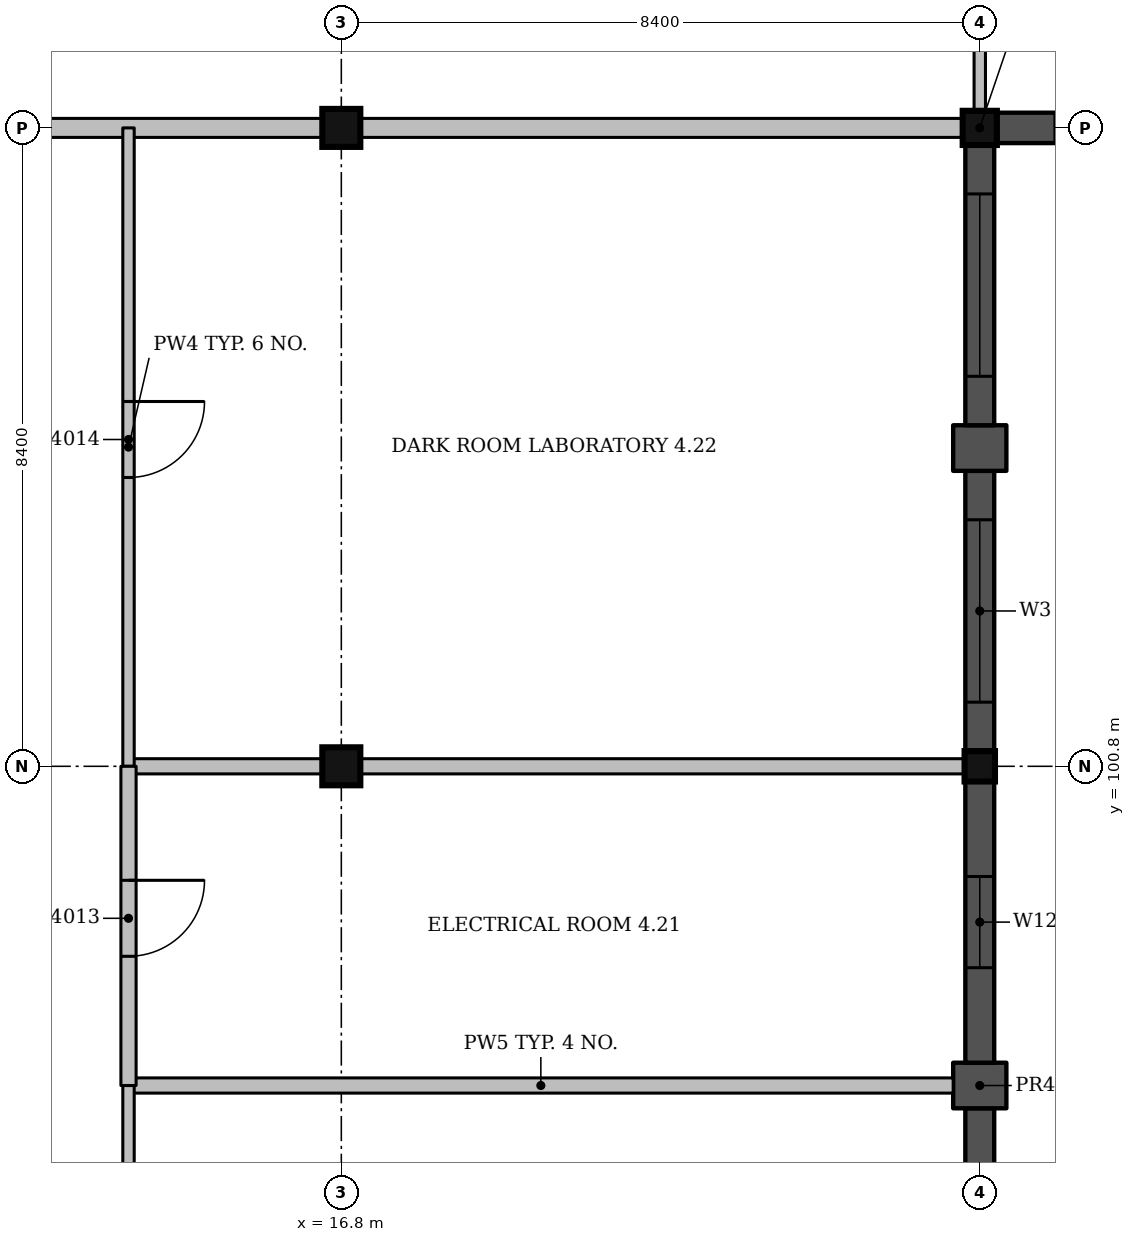
"""IFC4 building model, lengths in metres.
Left out: names, types, materials, properties, quantities, classifications, styles, units other than length and angle.
Written with IfcOpenShell. Run it as: python <this file> out.ifc"""

import sys

from ifc_helpers import new_model, si_unit, direction, frame, frame_2d, origin, origin_2d, place, context, subcontext, project, spatial, rectangle, extrude, element, fill, save


model = new_model("IFC4")
c1 = context("Model", 3, precision=1e-05, world=origin(), true_north=direction((0.0, 1.0)))
c2 = subcontext(c1, "Body", "Model", "MODEL_VIEW")
j1 = project(units=[si_unit("LENGTHUNIT", "METRE"), si_unit("PLANEANGLEUNIT", "RADIAN")], contexts=[c1])
p1 = place(None, origin())
s1 = spatial("IfcSite", under=j1, at=p1, CompositionType="ELEMENT")
p2 = place(p1, origin())
s2 = spatial("IfcBuilding", under=s1, at=p2, CompositionType="ELEMENT")
p3 = place(p2, frame((0.0, 0.0, 18.0)))
s3 = spatial("IfcBuildingStorey", under=s2, at=p3, CompositionType="ELEMENT", Elevation=18.0)
for number, where, z_axis, x_axis in (
    (1, (16.8, 100.8, 0.0), (0.0, 0.0, 1.0), (1.0, 0.0, 0.0)),
    (2, (16.8, 109.2, 0.0), (0.0, 0.0, 1.0), (1.0, 0.0, 0.0)),
):
    element("IfcColumn", number, at=place(p3, frame(where, z_axis=z_axis, x_axis=x_axis)), inside=s3, PredefinedType="COLUMN", context=c2, shape_type="SweptSolid", body=[
        extrude(rectangle(XDim=0.5, YDim=0.5, at=origin_2d()), origin(), (0.0, 0.0, 1.0), 4.5),
    ])
p4 = place(p3, frame((25.2, 100.8, 0.0), z_axis=(0.0, 0.0, 1.0), x_axis=(1.0, 0.0, 0.0)))
e3 = element("IfcColumn", 3, at=p4, inside=s3, PredefinedType="COLUMN", context=c2, shape_type="SweptSolid", body=[
    extrude(rectangle(XDim=0.4, YDim=0.4, at=origin_2d()), origin(), (0.0, 0.0, 1.0), 4.5),
])
p5 = place(p3, frame((25.2, 109.2, 0.0), z_axis=(0.0, 0.0, 1.0), x_axis=(1.0, 0.0, 0.0)))
e4 = element("IfcColumn", 4, at=p5, inside=s3, PredefinedType="COLUMN", context=c2, shape_type="SweptSolid", body=[
    extrude(rectangle(XDim=0.45, YDim=0.45, at=origin_2d()), origin(), (0.0, 0.0, 1.0), 4.5),
])
p6 = place(p3, frame((25.2, 92.6, 0.0), z_axis=(0.0, 0.0, 1.0), x_axis=(0.0, 1.0, 0.0)))
e5 = element("IfcWall", 5, at=p6, inside=s3, PredefinedType="SOLIDWALL", context=c2, shape_type="SweptSolid", body=[
    extrude(rectangle(XDim=3.7, YDim=0.38, at=frame_2d((1.85, 0.0))), origin(), (0.0, 0.0, 1.0), 3.35),
])
p7 = place(p6, frame((1.25, 0.0, 0.9)))
e6 = element("IfcOpeningElement", 6, at=p7, cuts=e5, PredefinedType="OPENING", context=c2, shape_type="SweptSolid", body=[
    extrude(rectangle(XDim=1.2, YDim=2.1, at=frame_2d((0.6, 1.05))), frame((0.0, 0.2, 0.0), z_axis=(0.0, -1.0, 0.0), x_axis=(1.0, 0.0, 0.0)), (0.0, 0.0, 1.0), 0.4),
])
p8 = place(p3, frame((25.2, 96.3, 0.0), z_axis=(0.0, 0.0, 1.0), x_axis=(0.0, 1.0, 0.0)))
e7 = element("IfcWall", 7, at=p8, inside=s3, PredefinedType="SOLIDWALL", context=c2, shape_type="SweptSolid", body=[
    extrude(rectangle(XDim=0.6, YDim=0.7, at=frame_2d((0.3, 0.0))), origin(), (0.0, 0.0, 1.0), 3.35),
])
p9 = place(p3, frame((25.2, 96.9, 0.0), z_axis=(0.0, 0.0, 1.0), x_axis=(0.0, 1.0, 0.0)))
e8 = element("IfcWall", 8, at=p9, inside=s3, PredefinedType="SOLIDWALL", context=c2, shape_type="SweptSolid", body=[
    extrude(rectangle(XDim=3.7, YDim=0.38, at=frame_2d((1.85, 0.0))), origin(), (0.0, 0.0, 1.0), 3.35),
])
p10 = place(p9, frame((1.25, 0.0, 2.4)))
e9 = element("IfcOpeningElement", 9, at=p10, cuts=e8, PredefinedType="OPENING", context=c2, shape_type="SweptSolid", body=[
    extrude(rectangle(XDim=1.2, YDim=0.6, at=frame_2d((0.6, 0.3))), frame((0.0, 0.2, 0.0), z_axis=(0.0, -1.0, 0.0), x_axis=(1.0, 0.0, 0.0)), (0.0, 0.0, 1.0), 0.4),
])
p11 = place(p3, frame((25.2, 101.0, 0.0), z_axis=(0.0, 0.0, 1.0), x_axis=(0.0, 1.0, 0.0)))
e10 = element("IfcWall", 10, at=p11, inside=s3, PredefinedType="SOLIDWALL", context=c2, shape_type="SweptSolid", body=[
    extrude(rectangle(XDim=3.688, YDim=0.38, at=frame_2d((1.844, 0.0))), origin(), (0.0, 0.0, 1.0), 3.35),
])
p12 = place(p11, frame((0.644, 0.0, 1.2)))
e11 = element("IfcOpeningElement", 11, at=p12, cuts=e10, PredefinedType="OPENING", context=c2, shape_type="SweptSolid", body=[
    extrude(rectangle(XDim=2.4, YDim=1.5, at=frame_2d((1.2, 0.75))), frame((0.0, 0.2, 0.0), z_axis=(0.0, -1.0, 0.0), x_axis=(1.0, 0.0, 0.0)), (0.0, 0.0, 1.0), 0.4),
])
p13 = place(p3, frame((25.2, 104.688, 0.0), z_axis=(0.0, 0.0, 1.0), x_axis=(0.0, 1.0, 0.0)))
e12 = element("IfcWall", 12, at=p13, inside=s3, PredefinedType="SOLIDWALL", context=c2, shape_type="SweptSolid", body=[
    extrude(rectangle(XDim=0.6, YDim=0.7, at=frame_2d((0.3, 0.0))), origin(), (0.0, 0.0, 1.0), 3.35),
])
p14 = place(p3, frame((25.2, 105.288, 0.0), z_axis=(0.0, 0.0, 1.0), x_axis=(0.0, 1.0, 0.0)))
e13 = element("IfcWall", 13, at=p14, inside=s3, PredefinedType="SOLIDWALL", context=c2, shape_type="SweptSolid", body=[
    extrude(rectangle(XDim=3.688, YDim=0.38, at=frame_2d((1.844, 0.0))), origin(), (0.0, 0.0, 1.0), 3.35),
])
p15 = place(p14, frame((0.644, 0.0, 1.2)))
e14 = element("IfcOpeningElement", 14, at=p15, cuts=e13, PredefinedType="OPENING", context=c2, shape_type="SweptSolid", body=[
    extrude(rectangle(XDim=2.4, YDim=1.5, at=frame_2d((1.2, 0.75))), frame((0.0, 0.2, 0.0), z_axis=(0.0, -1.0, 0.0), x_axis=(1.0, 0.0, 0.0)), (0.0, 0.0, 1.0), 0.4),
])
p16 = place(p3, frame((25.425, 109.2, 0.0), z_axis=(0.0, 0.0, 1.0), x_axis=(1.0, 0.0, 0.0)))
e15 = element("IfcWall", 15, at=p16, inside=s3, PredefinedType="SOLIDWALL", context=c2, shape_type="SweptSolid", body=[
    extrude(rectangle(XDim=3.927, YDim=0.4, at=frame_2d((1.964, 0.0))), origin(), (0.0, 0.0, 1.0), 4.2),
])
p17 = place(p16, frame((0.764, 0.0, 0.6)))
e16 = element("IfcOpeningElement", 16, at=p17, cuts=e15, PredefinedType="OPENING", context=c2, shape_type="SweptSolid", body=[
    extrude(rectangle(XDim=2.4, YDim=2.4, at=frame_2d((1.2, 1.2))), frame((0.0, 0.21, 0.0), z_axis=(0.0, -1.0, 0.0), x_axis=(1.0, 0.0, 0.0)), (0.0, 0.0, 1.0), 0.42),
])
p18 = place(p3, frame((14.0, 96.6, 0.0), z_axis=(0.0, 0.0, 1.0), x_axis=(1.0, 0.0, 0.0)))
e17 = element("IfcWall", 17, at=p18, inside=s3, PredefinedType="PARTITIONING", context=c2, shape_type="SweptSolid", body=[
    extrude(rectangle(XDim=10.85, YDim=0.2, at=frame_2d((5.425, 0.0))), origin(), (0.0, 0.0, 1.0), 3.4),
])
p19 = place(p3, frame((14.0, 100.8, 0.0), z_axis=(0.0, 0.0, 1.0), x_axis=(1.0, 0.0, 0.0)))
e18 = element("IfcWall", 18, at=p19, inside=s3, PredefinedType="PARTITIONING", context=c2, shape_type="SweptSolid", body=[
    extrude(rectangle(XDim=2.55, YDim=0.2, at=frame_2d((1.275, 0.0))), origin(), (0.0, 0.0, 1.0), 3.4),
])
p20 = place(p3, frame((17.05, 100.8, 0.0), z_axis=(0.0, 0.0, 1.0), x_axis=(1.0, 0.0, 0.0)))
e19 = element("IfcWall", 19, at=p20, inside=s3, PredefinedType="PARTITIONING", context=c2, shape_type="SweptSolid", body=[
    extrude(rectangle(XDim=7.95, YDim=0.2, at=frame_2d((3.975, 0.0))), origin(), (0.0, 0.0, 1.0), 3.35),
])
p21 = place(p3, frame((8.65, 109.2, 0.0), z_axis=(0.0, 0.0, 1.0), x_axis=(1.0, 0.0, 0.0)))
e20 = element("IfcWall", 20, at=p21, inside=s3, PredefinedType="SOLIDWALL", context=c2, shape_type="SweptSolid", body=[
    extrude(rectangle(XDim=7.9, YDim=0.25, at=frame_2d((3.95, 0.0))), origin(), (0.0, 0.0, 1.0), 4.15),
])
p22 = place(p3, frame((17.05, 109.2, 0.0), z_axis=(0.0, 0.0, 1.0), x_axis=(1.0, 0.0, 0.0)))
e21 = element("IfcWall", 21, at=p22, inside=s3, PredefinedType="SOLIDWALL", context=c2, shape_type="SweptSolid", body=[
    extrude(rectangle(XDim=7.925, YDim=0.25, at=frame_2d((3.962, 0.0))), origin(), (0.0, 0.0, 1.0), 3.35),
])
p23 = place(p3, frame((14.0, 92.4, 0.0), z_axis=(0.0, 0.0, 1.0), x_axis=(0.0, 1.0, 0.0)))
e22 = element("IfcWall", 22, at=p23, inside=s3, PredefinedType="PARTITIONING", context=c2, shape_type="SweptSolid", body=[
    extrude(rectangle(XDim=4.2, YDim=0.15, at=frame_2d((2.1, 0.0))), origin(), (0.0, 0.0, 1.0), 3.4),
])
p24 = place(p23, frame((1.7, 0.0, 0.0)))
e23 = element("IfcOpeningElement", 23, at=p24, cuts=e22, PredefinedType="OPENING", context=c2, shape_type="SweptSolid", body=[
    extrude(rectangle(XDim=0.9, YDim=2.1, at=frame_2d((0.45, 1.05))), frame((0.0, 0.085, 0.0), z_axis=(0.0, -1.0, 0.0), x_axis=(1.0, 0.0, 0.0)), (0.0, 0.0, 1.0), 0.17),
])
p25 = place(p3, frame((14.0, 100.8, 0.0), z_axis=(0.0, 0.0, 1.0), x_axis=(0.0, 1.0, 0.0)))
e24 = element("IfcWall", 24, at=p25, inside=s3, PredefinedType="PARTITIONING", context=c2, shape_type="SweptSolid", body=[
    extrude(rectangle(XDim=8.4, YDim=0.15, at=frame_2d((4.2, 0.0))), origin(), (0.0, 0.0, 1.0), 3.4),
])
p26 = place(p25, frame((3.8, 0.0, 0.0)))
e25 = element("IfcOpeningElement", 25, at=p26, cuts=e24, PredefinedType="OPENING", context=c2, shape_type="SweptSolid", body=[
    extrude(rectangle(XDim=1.0, YDim=2.1, at=frame_2d((0.5, 1.05))), frame((0.0, 0.085, 0.0), z_axis=(0.0, -1.0, 0.0), x_axis=(1.0, 0.0, 0.0)), (0.0, 0.0, 1.0), 0.17),
])
p27 = place(p3, frame((14.0, 96.6, 0.0), z_axis=(0.0, 0.0, 1.0), x_axis=(0.0, 1.0, 0.0)))
e26 = element("IfcWall", 26, at=p27, inside=s3, PredefinedType="PARTITIONING", context=c2, shape_type="SweptSolid", body=[
    extrude(rectangle(XDim=4.2, YDim=0.2, at=frame_2d((2.1, 0.0))), origin(), (0.0, 0.0, 1.0), 3.4),
])
p28 = place(p27, frame((1.7, 0.0, 0.0)))
e27 = element("IfcOpeningElement", 27, at=p28, cuts=e26, PredefinedType="OPENING", context=c2, shape_type="SweptSolid", body=[
    extrude(rectangle(XDim=1.0, YDim=2.1, at=frame_2d((0.5, 1.05))), frame((0.0, 0.11, 0.0), z_axis=(0.0, -1.0, 0.0), x_axis=(1.0, 0.0, 0.0)), (0.0, 0.0, 1.0), 0.22),
])
p29 = place(p3, frame((25.2, 109.425, 0.0), z_axis=(0.0, 0.0, 1.0), x_axis=(0.0, 1.0, 0.0)))
e28 = element("IfcWall", 28, at=p29, inside=s3, PredefinedType="PARTITIONING", context=c2, shape_type="SweptSolid", body=[
    extrude(rectangle(XDim=7.925, YDim=0.15, at=frame_2d((3.962, 0.0))), origin(), (0.0, 0.0, 1.0), 4.15),
])
p30 = place(p10, origin())
e29 = element("IfcWindow", 29, at=p30, inside=s3, PartitioningType="SINGLE_PANEL", PredefinedType="WINDOW", context=c2, shape_type="SweptSolid", body=[
    extrude(rectangle(XDim=1.2, YDim=0.6, at=frame_2d((0.6, 0.3))), frame((0.0, 0.15, 0.0), z_axis=(0.0, -1.0, 0.0), x_axis=(1.0, 0.0, 0.0)), (0.0, 0.0, 1.0), 0.06),
])
fill(e9, e29)
p31 = place(p12, origin())
e30 = element("IfcWindow", 30, at=p31, inside=s3, PartitioningType="SINGLE_PANEL", PredefinedType="WINDOW", context=c2, shape_type="SweptSolid", body=[
    extrude(rectangle(XDim=2.4, YDim=1.5, at=frame_2d((1.2, 0.75))), frame((0.0, 0.15, 0.0), z_axis=(0.0, -1.0, 0.0), x_axis=(1.0, 0.0, 0.0)), (0.0, 0.0, 1.0), 0.06),
])
fill(e11, e30)
p32 = place(p15, origin())
e31 = element("IfcWindow", 31, at=p32, inside=s3, PartitioningType="SINGLE_PANEL", PredefinedType="WINDOW", context=c2, shape_type="SweptSolid", body=[
    extrude(rectangle(XDim=2.4, YDim=1.5, at=frame_2d((1.2, 0.75))), frame((0.0, 0.15, 0.0), z_axis=(0.0, -1.0, 0.0), x_axis=(1.0, 0.0, 0.0)), (0.0, 0.0, 1.0), 0.06),
])
fill(e14, e31)
p33 = place(p17, origin())
e32 = element("IfcWindow", 32, at=p33, inside=s3, PartitioningType="SINGLE_PANEL", PredefinedType="WINDOW", context=c2, shape_type="SweptSolid", body=[
    extrude(rectangle(XDim=2.4, YDim=2.4, at=frame_2d((1.2, 1.2))), frame((0.0, 0.16, 0.0), z_axis=(0.0, -1.0, 0.0), x_axis=(1.0, 0.0, 0.0)), (0.0, 0.0, 1.0), 0.06),
])
fill(e16, e32)
p34 = place(p28, origin())
e33 = element("IfcDoor", 33, at=p34, inside=s3, OperationType="SINGLE_SWING_RIGHT", PredefinedType="DOOR", context=c2, shape_type="SweptSolid", body=[
    extrude(rectangle(XDim=1.0, YDim=2.1, at=frame_2d((0.5, 1.05))), frame((0.0, 0.025, 0.0), z_axis=(0.0, -1.0, 0.0), x_axis=(1.0, 0.0, 0.0)), (0.0, 0.0, 1.0), 0.05),
])
fill(e27, e33)
p35 = place(p26, origin())
e34 = element("IfcDoor", 34, at=p35, inside=s3, OperationType="SINGLE_SWING_RIGHT", PredefinedType="DOOR", context=c2, shape_type="SweptSolid", body=[
    extrude(rectangle(XDim=1.0, YDim=2.1, at=frame_2d((0.5, 1.05))), frame((0.0, 0.025, 0.0), z_axis=(0.0, -1.0, 0.0), x_axis=(1.0, 0.0, 0.0)), (0.0, 0.0, 1.0), 0.05),
])
fill(e25, e34)
save(model, sys.argv[1])
